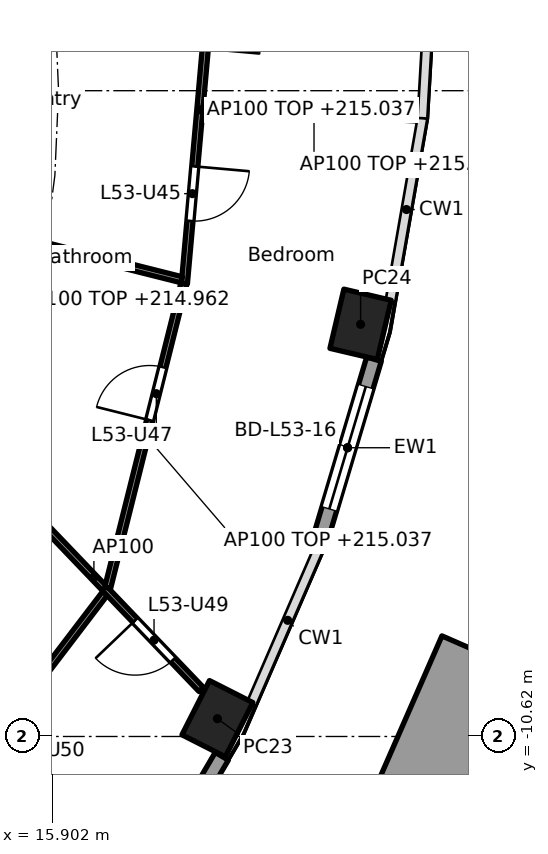
"""IFC4 building model, lengths in metres.
Left out: names, types, materials, properties, quantities, classifications, styles, units other than length and angle.
Written with IfcOpenShell. Run it as: python <this file> out.ifc"""

import sys

from ifc_helpers import new_model, si_unit, direction, frame, frame_2d, origin, origin_2d, place, context, subcontext, project, spatial, rectangle, hollow_rectangle, extrude, element, fill, save


model = new_model("IFC4")
c1 = context("Model", 3, precision=1e-05, world=origin(), true_north=direction((0.0, 1.0)))
c2 = subcontext(c1, "Body", "Model", "MODEL_VIEW")
j1 = project(units=[si_unit("LENGTHUNIT", "METRE"), si_unit("PLANEANGLEUNIT", "RADIAN")], contexts=[c1])
p1 = place(None, origin())
s1 = spatial("IfcSite", under=j1, at=p1, CompositionType="ELEMENT")
p2 = place(p1, origin())
s2 = spatial("IfcBuilding", under=s1, at=p2, CompositionType="ELEMENT")
p3 = place(p2, frame((0.0, 0.0, 212.2)))
s3 = spatial("IfcBuildingStorey", under=s2, at=p3, CompositionType="ELEMENT", Elevation=212.2)
for number, where, z_axis, x_axis in (
    (1, (18.612, -10.327, -0.26), (0.0, 0.0, 1.0), (0.452, 0.892, 0.0)),
    (2, (20.967, -3.842, -0.26), (0.0, 0.0, 1.0), (0.229, 0.973, 0.0)),
):
    element("IfcColumn", number, at=place(p3, frame(where, z_axis=z_axis, x_axis=x_axis)), inside=s3, PredefinedType="COLUMN", context=c2, shape_type="SweptSolid", body=[
        extrude(hollow_rectangle(XDim=1.0, YDim=0.8, WallThickness=0.032, at=origin_2d()), origin(), (0.0, 0.0, 1.0), 3.96),
    ])
p4 = place(p3, frame((18.684, -10.945, 0.0), z_axis=(0.0, 0.0, 1.0), x_axis=(-0.5063555387, -0.862324804484, 0.0)))
e3 = element("IfcWall", 3, at=p4, inside=s3, PredefinedType="SOLIDWALL", context=c2, shape_type="SweptSolid", body=[
    extrude(rectangle(XDim=2.955, YDim=0.25, at=frame_2d((1.477, 0.0))), origin(), (0.0, 0.0, 1.0), 3.44),
])
p5 = place(p4, frame((0.427, 0.0, 0.0)))
e4 = element("IfcOpeningElement", 4, at=p5, cuts=e3, PredefinedType="OPENING", context=c2, shape_type="SweptSolid", body=[
    extrude(rectangle(XDim=2.1, YDim=2.4, at=frame_2d((1.05, 1.2))), frame((0.0, 0.135, 0.0), z_axis=(0.0, -1.0, 0.0), x_axis=(1.0, 0.0, 0.0)), (0.0, 0.0, 1.0), 0.27),
])
p6 = place(p3, frame((21.187, -4.415, 0.0), z_axis=(0.0, 0.0, 1.0), x_axis=(-0.285785716255, -0.958293548128, 0.0)))
e5 = element("IfcWall", 5, at=p6, inside=s3, PredefinedType="SOLIDWALL", context=c2, shape_type="SweptSolid", body=[
    extrude(rectangle(XDim=3.04, YDim=0.25, at=frame_2d((1.52, 0.0))), origin(), (0.0, 0.0, 1.0), 3.44),
])
p7 = place(p6, frame((0.47, 0.0, 0.0)))
e6 = element("IfcOpeningElement", 6, at=p7, cuts=e5, PredefinedType="OPENING", context=c2, shape_type="SweptSolid", body=[
    extrude(rectangle(XDim=2.1, YDim=2.4, at=frame_2d((1.05, 1.2))), frame((0.0, 0.135, 0.0), z_axis=(0.0, -1.0, 0.0), x_axis=(1.0, 0.0, 0.0)), (0.0, 0.0, 1.0), 0.27),
])
p8 = place(p3, frame((25.737, -10.746, 0.0), z_axis=(0.0, 0.0, 1.0), x_axis=(-0.506206860149, -0.862412091021, 0.0)))
e7 = element("IfcWall", 7, at=p8, inside=s3, PredefinedType="SOLIDWALL", context=c2, shape_type="SweptSolid", body=[
    extrude(rectangle(XDim=10.039, YDim=1.6, at=frame_2d((5.02, 0.0))), origin(), (0.0, 0.0, 1.0), 1.1),
])
p9 = place(p3, frame((20.343, -15.443, 0.0), z_axis=(0.0, 0.0, 1.0), x_axis=(0.400883628547, 0.916128984567, 0.0)))
e8 = element("IfcWall", 8, at=p9, inside=s3, PredefinedType="SOLIDWALL", context=c2, shape_type="SweptSolid", body=[
    extrude(rectangle(XDim=6.72, YDim=1.6, at=frame_2d((3.36, 0.0))), origin(), (0.0, 0.0, 1.0), 1.1),
])
p10 = place(p3, frame((18.578, 2.542, 0.0), z_axis=(0.0, 0.0, 1.0), x_axis=(-0.088651453697, -0.996062708748, 0.0)))
e9 = element("IfcWall", 9, at=p10, inside=s3, PredefinedType="PARTITIONING", context=c2, shape_type="SweptSolid", body=[
    extrude(rectangle(XDim=5.737, YDim=0.1, at=frame_2d((2.868, 0.0))), origin(), (0.0, 0.0, 1.0), 2.837),
])
p11 = place(p10, frame((3.802, 0.0, 0.0)))
e10 = element("IfcOpeningElement", 10, at=p11, cuts=e9, PredefinedType="OPENING", context=c2, shape_type="SweptSolid", body=[
    extrude(rectangle(XDim=0.9, YDim=2.1, at=frame_2d((0.45, 1.05))), frame((0.0, 0.06, 0.0), z_axis=(0.0, -1.0, 0.0), x_axis=(1.0, 0.0, 0.0)), (0.0, 0.0, 1.0), 0.12),
])
p12 = place(p10, frame((0.959, 0.0, 0.0)))
e11 = element("IfcOpeningElement", 11, at=p12, cuts=e9, PredefinedType="OPENING", context=c2, shape_type="SweptSolid", body=[
    extrude(rectangle(XDim=0.9, YDim=2.1, at=frame_2d((0.45, 1.05))), frame((0.0, 0.06, 0.0), z_axis=(0.0, -1.0, 0.0), x_axis=(1.0, 0.0, 0.0)), (0.0, 0.0, 1.0), 0.12),
])
p13 = place(p3, frame((12.782, -13.491, 0.0), z_axis=(0.0, 0.0, 1.0), x_axis=(0.606136140755, 0.795360911078, 0.0)))
e12 = element("IfcWall", 12, at=p13, inside=s3, PredefinedType="PARTITIONING", context=c2, shape_type="SweptSolid", body=[
    extrude(rectangle(XDim=6.57, YDim=0.1, at=frame_2d((3.285, 0.0))), origin(), (0.0, 0.0, 1.0), 2.837),
])
p14 = place(p13, frame((2.86, 0.0, 0.0)))
e13 = element("IfcOpeningElement", 13, at=p14, cuts=e12, PredefinedType="OPENING", context=c2, shape_type="SweptSolid", body=[
    extrude(rectangle(XDim=0.9, YDim=2.1, at=frame_2d((0.45, 1.05))), frame((0.0, 0.06, 0.0), z_axis=(0.0, -1.0, 0.0), x_axis=(1.0, 0.0, 0.0)), (0.0, 0.0, 1.0), 0.12),
])
p15 = place(p3, frame((14.817, -6.159, 0.0), z_axis=(0.0, 0.0, 1.0), x_axis=(0.691437669875, -0.722436120828, 0.0)))
e14 = element("IfcWall", 14, at=p15, inside=s3, PredefinedType="PARTITIONING", context=c2, shape_type="SweptSolid", body=[
    extrude(rectangle(XDim=5.104, YDim=0.1, at=frame_2d((2.552, 0.0))), origin(), (0.0, 0.0, 1.0), 3.44),
])
p16 = place(p15, frame((3.532, 0.0, 0.0)))
e15 = element("IfcOpeningElement", 15, at=p16, cuts=e14, PredefinedType="OPENING", context=c2, shape_type="SweptSolid", body=[
    extrude(rectangle(XDim=0.9, YDim=2.1, at=frame_2d((0.45, 1.05))), frame((0.0, 0.06, 0.0), z_axis=(0.0, -1.0, 0.0), x_axis=(1.0, 0.0, 0.0)), (0.0, 0.0, 1.0), 0.12),
])
p17 = place(p3, frame((16.807, -8.177, 0.0), z_axis=(0.0, 0.0, 1.0), x_axis=(0.243002985225, 0.970025540474, 0.0)))
e16 = element("IfcWall", 16, at=p17, inside=s3, PredefinedType="PARTITIONING", context=c2, shape_type="SweptSolid", body=[
    extrude(rectangle(XDim=5.162, YDim=0.1, at=frame_2d((2.581, 0.0))), origin(), (0.0, 0.0, 1.0), 2.837),
])
p18 = place(p17, frame((2.844, 0.0, 0.0)))
e17 = element("IfcOpeningElement", 17, at=p18, cuts=e16, PredefinedType="OPENING", context=c2, shape_type="SweptSolid", body=[
    extrude(rectangle(XDim=0.9, YDim=2.1, at=frame_2d((0.45, 1.05))), frame((0.0, 0.06, 0.0), z_axis=(0.0, -1.0, 0.0), x_axis=(1.0, 0.0, 0.0)), (0.0, 0.0, 1.0), 0.12),
])
p19 = place(p3, frame((12.662, -1.759, 0.0), z_axis=(0.0, 0.0, 1.0), x_axis=(0.969746519828, -0.24411408661, 0.0)))
e18 = element("IfcWall", 18, at=p19, inside=s3, PredefinedType="PARTITIONING", context=c2, shape_type="SweptSolid", body=[
    extrude(rectangle(XDim=5.531, YDim=0.1, at=frame_2d((2.765, 0.0))), origin(), (0.0, 0.0, 1.0), 2.762),
])
p20 = place(p19, frame((0.874, 0.0, 0.0)))
e19 = element("IfcOpeningElement", 19, at=p20, cuts=e18, PredefinedType="OPENING", context=c2, shape_type="SweptSolid", body=[
    extrude(rectangle(XDim=0.9, YDim=2.1, at=frame_2d((0.45, 1.05))), frame((0.0, 0.06, 0.0), z_axis=(0.0, -1.0, 0.0), x_axis=(1.0, 0.0, 0.0)), (0.0, 0.0, 1.0), 0.12),
])
p21 = place(p3, frame((18.378, -0.267, 0.0), z_axis=(0.0, 0.0, 1.0), x_axis=(0.998670331817, -0.051551608585, 0.0)))
e20 = element("IfcWall", 20, at=p21, inside=s3, PredefinedType="PARTITIONING", context=c2, shape_type="SweptSolid", body=[
    extrude(rectangle(XDim=3.651, YDim=0.1, at=frame_2d((1.826, 0.0))), origin(), (0.0, 0.0, 1.0), 2.983),
])
p22 = place(p7, origin())
e21 = element("IfcDoor", 21, at=p22, inside=s3, OperationType="SLIDING_TO_LEFT", PredefinedType="DOOR", context=c2, shape_type="SweptSolid", body=[
    extrude(rectangle(XDim=2.1, YDim=2.4, at=frame_2d((1.05, 1.2))), frame((0.0, 0.025, 0.0), z_axis=(0.0, -1.0, 0.0), x_axis=(1.0, 0.0, 0.0)), (0.0, 0.0, 1.0), 0.05),
])
fill(e6, e21)
p23 = place(p11, origin())
e22 = element("IfcDoor", 22, at=p23, inside=s3, OperationType="SINGLE_SWING_LEFT", PredefinedType="DOOR", context=c2, shape_type="SweptSolid", body=[
    extrude(rectangle(XDim=0.9, YDim=2.1, at=frame_2d((0.45, 1.05))), frame((0.0, 0.025, 0.0), z_axis=(0.0, -1.0, 0.0), x_axis=(1.0, 0.0, 0.0)), (0.0, 0.0, 1.0), 0.05),
])
fill(e10, e22)
p24 = place(p18, origin())
e23 = element("IfcDoor", 23, at=p24, inside=s3, OperationType="SINGLE_SWING_LEFT", PredefinedType="DOOR", context=c2, shape_type="SweptSolid", body=[
    extrude(rectangle(XDim=0.9, YDim=2.1, at=frame_2d((0.45, 1.05))), frame((0.0, 0.025, 0.0), z_axis=(0.0, -1.0, 0.0), x_axis=(1.0, 0.0, 0.0)), (0.0, 0.0, 1.0), 0.05),
])
fill(e17, e23)
p25 = place(p16, frame((0.9, 0.0, 0.0), x_axis=(-1.0, 0.0, 0.0)))
e24 = element("IfcDoor", 24, at=p25, inside=s3, OperationType="SINGLE_SWING_RIGHT", PredefinedType="DOOR", context=c2, shape_type="SweptSolid", body=[
    extrude(rectangle(XDim=0.9, YDim=2.1, at=frame_2d((0.45, 1.05))), frame((0.0, 0.025, 0.0), z_axis=(0.0, -1.0, 0.0), x_axis=(1.0, 0.0, 0.0)), (0.0, 0.0, 1.0), 0.05),
])
fill(e15, e24)
save(model, sys.argv[1])
